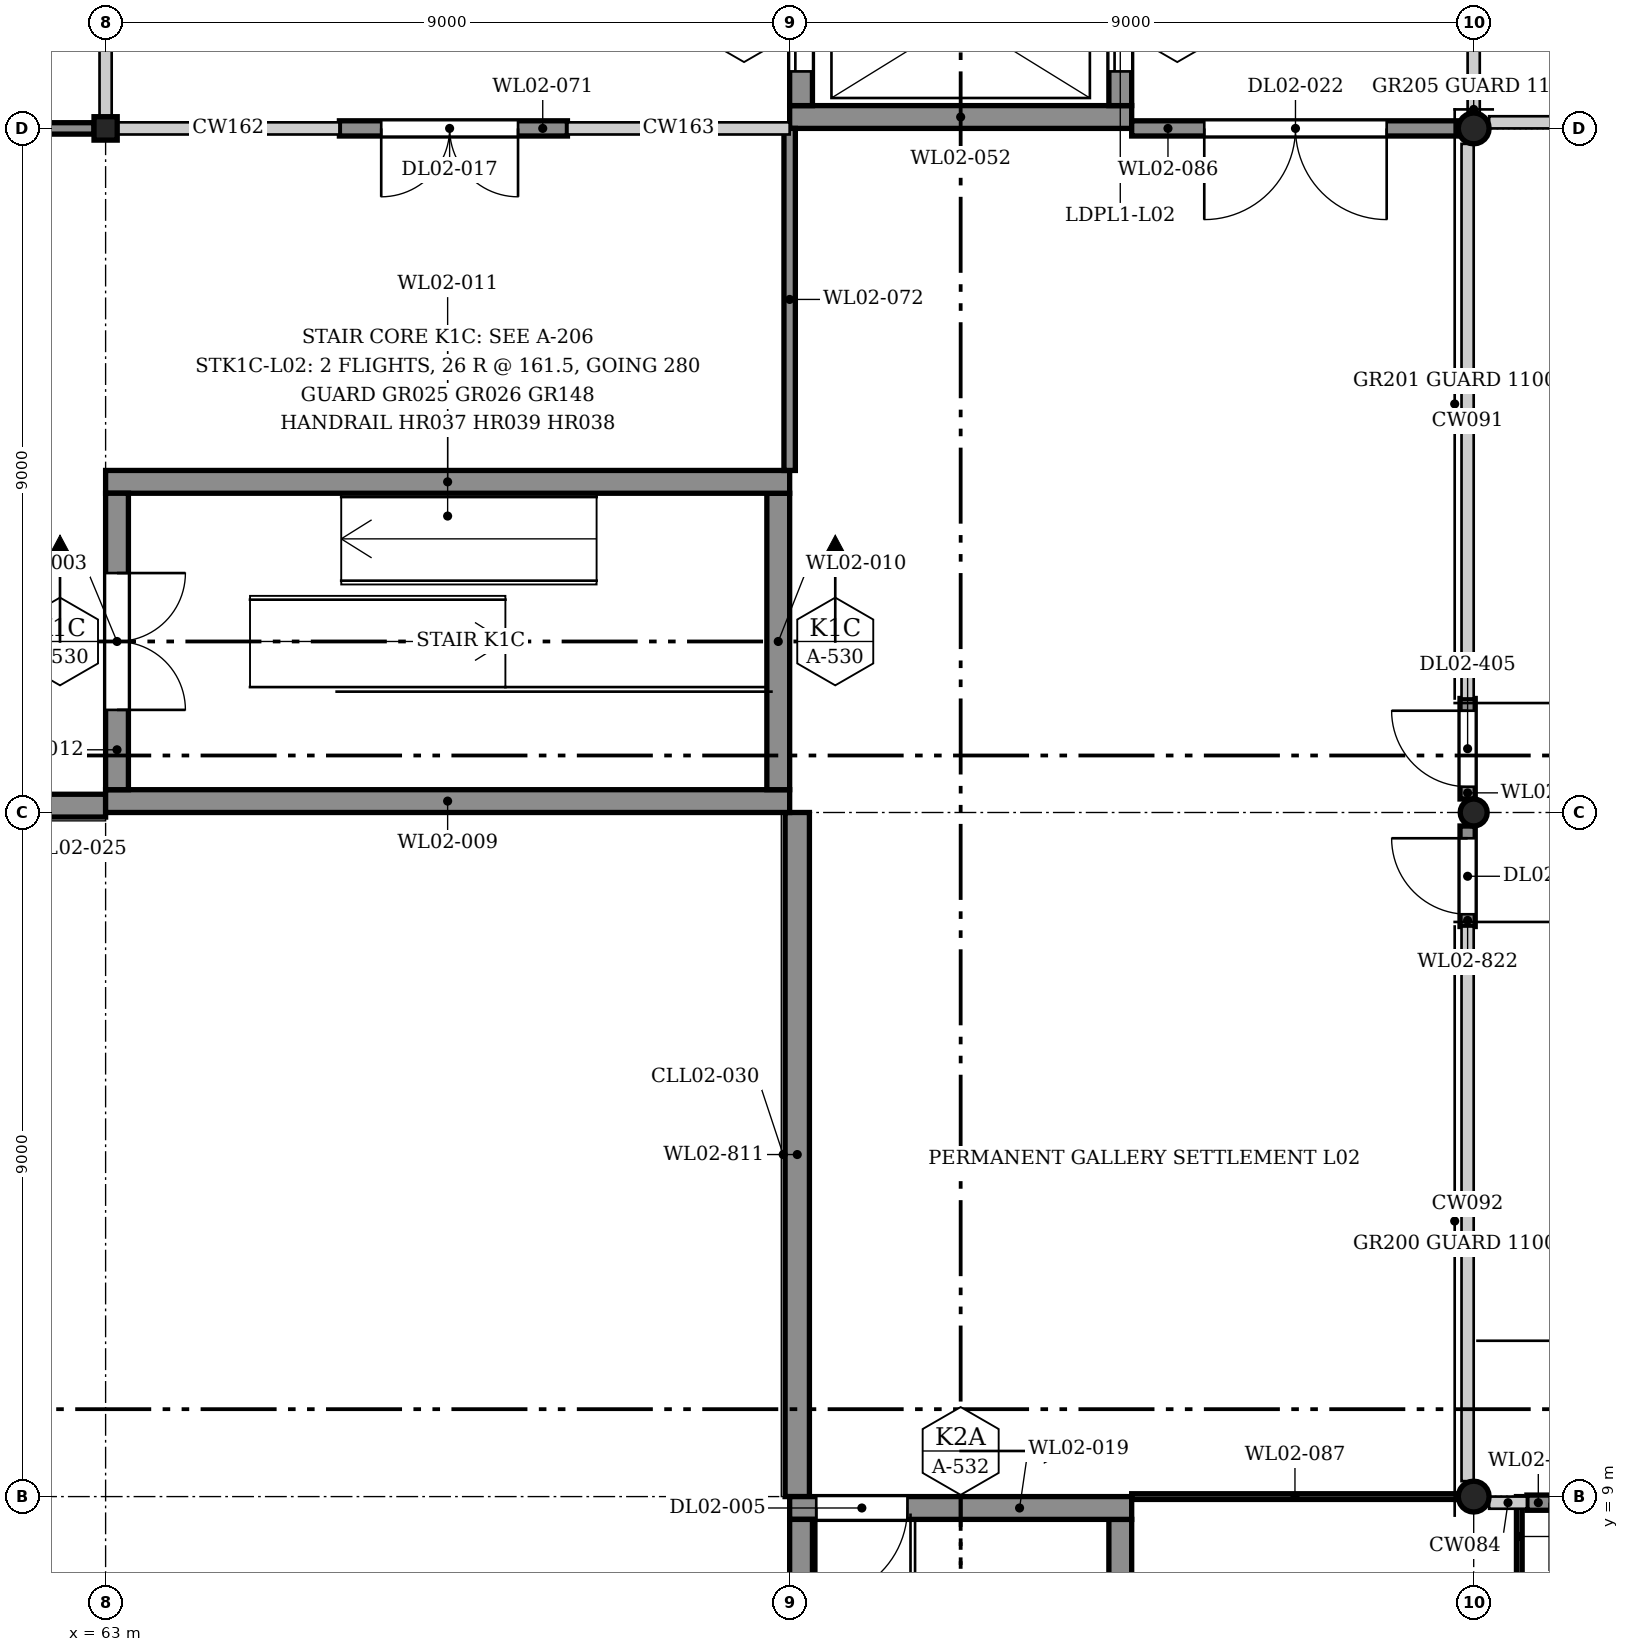
"""IFC4 building model, lengths in metres.
Left out: names, types, materials, properties, quantities, classifications, styles, units other than length and angle.
Written with IfcOpenShell. Run it as: python <this file> out.ifc"""

import sys

from ifc_helpers import new_model, si_unit, direction, frame, frame_2d, origin, origin_2d, place, context, subcontext, project, spatial, rectangle, hollow_circle, i_section, extrude, element, fill, save


model = new_model("IFC4")
c1 = context("Model", 3, precision=1e-05, world=origin(), true_north=direction((0.0, 1.0)))
c2 = subcontext(c1, "Body", "Model", "MODEL_VIEW")
j1 = project(units=[si_unit("LENGTHUNIT", "METRE"), si_unit("PLANEANGLEUNIT", "RADIAN")], contexts=[c1])
p1 = place(None, origin())
s1 = spatial("IfcSite", under=j1, at=p1, CompositionType="ELEMENT")
p2 = place(p1, origin())
s2 = spatial("IfcBuilding", under=s1, at=p2, CompositionType="ELEMENT")
p3 = place(p2, frame((0.0, 0.0, 9.2)))
s3 = spatial("IfcBuildingStorey", under=s2, at=p3, CompositionType="ELEMENT", Elevation=9.2)
p4 = place(p3, frame((81.0, 9.0, 0.0), z_axis=(0.0, 0.0, 1.0), x_axis=(1.0, 0.0, 0.0)))
e1 = element("IfcColumn", 1, at=p4, inside=s3, PredefinedType="COLUMN", context=c2, shape_type="SweptSolid", body=[
    extrude(hollow_circle(Radius=0.203, WallThickness=0.013, at=origin_2d()), origin(), (0.0, 0.0, 1.0), 4.2),
])
p5 = place(p3, frame((81.0, 18.0, 0.0), z_axis=(0.0, 0.0, 1.0), x_axis=(1.0, 0.0, 0.0)))
e2 = element("IfcColumn", 2, at=p5, inside=s3, PredefinedType="COLUMN", context=c2, shape_type="SweptSolid", body=[
    extrude(hollow_circle(Radius=0.178, WallThickness=0.013, at=origin_2d()), origin(), (0.0, 0.0, 1.0), 4.2),
])
p6 = place(p3, frame((63.0, 27.0, 0.0), z_axis=(0.0, 0.0, 1.0), x_axis=(1.0, 0.0, 0.0)))
e3 = element("IfcColumn", 3, at=p6, inside=s3, PredefinedType="COLUMN", context=c2, shape_type="SweptSolid", body=[
    extrude(i_section(OverallWidth=0.305, OverallDepth=0.308, WebThickness=0.01, FlangeThickness=0.015, FilletRadius=0.017, at=origin_2d()), origin(), (0.0, 0.0, 1.0), 4.2),
])
p7 = place(p3, frame((81.0, 27.0, 0.0), z_axis=(0.0, 0.0, 1.0), x_axis=(1.0, 0.0, 0.0)))
e4 = element("IfcColumn", 4, at=p7, inside=s3, PredefinedType="COLUMN", context=c2, shape_type="SweptSolid", body=[
    extrude(hollow_circle(Radius=0.203, WallThickness=0.013, at=origin_2d()), origin(), (0.0, 0.0, 1.0), 4.2),
])
p8 = place(p3, frame((54.25, 18.09, 0.0), z_axis=(0.0, 0.0, 1.0), x_axis=(1.0, 0.0, 0.0)))
e5 = element("IfcWall", 5, at=p8, inside=s3, PredefinedType="SOLIDWALL", context=c2, shape_type="SweptSolid", body=[
    extrude(rectangle(XDim=8.75, YDim=0.3, at=frame_2d((4.375, 0.0))), origin(), (0.0, 0.0, 1.0), 3.578),
])
p9 = place(p8, frame((1.4, 0.0, 0.9)))
e6 = element("IfcOpeningElement", 6, at=p9, cuts=e5, PredefinedType="OPENING", context=c2, shape_type="SweptSolid", body=[
    extrude(rectangle(XDim=1.2, YDim=2.3, at=frame_2d((0.6, 1.15))), frame((0.0, 0.16, 0.0), z_axis=(0.0, -1.0, 0.0), x_axis=(1.0, 0.0, 0.0)), (0.0, 0.0, 1.0), 0.32),
])
p10 = place(p8, frame((5.9, 0.0, 0.9)))
e7 = element("IfcOpeningElement", 7, at=p10, cuts=e5, PredefinedType="OPENING", context=c2, shape_type="SweptSolid", body=[
    extrude(rectangle(XDim=1.2, YDim=2.3, at=frame_2d((0.6, 1.15))), frame((0.0, 0.16, 0.0), z_axis=(0.0, -1.0, 0.0), x_axis=(1.0, 0.0, 0.0)), (0.0, 0.0, 1.0), 0.32),
])
p11 = place(p3, frame((72.1, 9.0, 0.0), z_axis=(0.0, 0.0, 1.0), x_axis=(0.0, 1.0, 0.0)))
e8 = element("IfcWall", 8, at=p11, inside=s3, PredefinedType="SOLIDWALL", context=c2, shape_type="SweptSolid", body=[
    extrude(rectangle(XDim=9.0, YDim=0.32, at=frame_2d((4.5, 0.0))), origin(), (0.0, 0.0, 1.0), 4.035),
])
p12 = place(p3, frame((81.7, 8.92, 0.0), z_axis=(0.0, 0.0, 1.0), x_axis=(1.0, 0.0, 0.0)))
e9 = element("IfcWall", 9, at=p12, inside=s3, PredefinedType="SOLIDWALL", context=c2, shape_type="SweptSolid", body=[
    extrude(rectangle(XDim=2.4, YDim=0.2, at=frame_2d((1.2, 0.0))), origin(), (0.0, 0.0, 1.0), 3.125),
])
p13 = place(p12, frame((0.3, 0.0, 0.0)))
e10 = element("IfcOpeningElement", 10, at=p13, cuts=e9, PredefinedType="OPENING", context=c2, shape_type="SweptSolid", body=[
    extrude(rectangle(XDim=1.8, YDim=2.4, at=frame_2d((0.9, 1.2))), frame((0.0, 0.11, 0.0), z_axis=(0.0, -1.0, 0.0), x_axis=(1.0, 0.0, 0.0)), (0.0, 0.0, 1.0), 0.22),
])
p14 = place(p3, frame((80.92, 18.178, 0.0), z_axis=(0.0, 0.0, 1.0), x_axis=(0.0, 1.0, 0.0)))
e11 = element("IfcWall", 11, at=p14, inside=s3, PredefinedType="SOLIDWALL", context=c2, shape_type="SweptSolid", body=[
    extrude(rectangle(XDim=1.322, YDim=0.2, at=frame_2d((0.661, 0.0))), origin(), (0.0, 0.0, 1.0), 3.428),
])
p15 = place(p14, frame((0.161, 0.0, 0.0)))
e12 = element("IfcOpeningElement", 12, at=p15, cuts=e11, PredefinedType="OPENING", context=c2, shape_type="SweptSolid", body=[
    extrude(rectangle(XDim=1.0, YDim=2.4, at=frame_2d((0.5, 1.2))), frame((0.0, 0.11, 0.0), z_axis=(0.0, -1.0, 0.0), x_axis=(1.0, 0.0, 0.0)), (0.0, 0.0, 1.0), 0.22),
])
p16 = place(p3, frame((80.92, 16.5, 0.0), z_axis=(0.0, 0.0, 1.0), x_axis=(0.0, 1.0, 0.0)))
e13 = element("IfcWall", 13, at=p16, inside=s3, PredefinedType="SOLIDWALL", context=c2, shape_type="SweptSolid", body=[
    extrude(rectangle(XDim=1.322, YDim=0.2, at=frame_2d((0.661, 0.0))), origin(), (0.0, 0.0, 1.0), 3.428),
])
p17 = place(p16, frame((0.161, 0.0, 0.0)))
e14 = element("IfcOpeningElement", 14, at=p17, cuts=e13, PredefinedType="OPENING", context=c2, shape_type="SweptSolid", body=[
    extrude(rectangle(XDim=1.0, YDim=2.4, at=frame_2d((0.5, 1.2))), frame((0.0, 0.11, 0.0), z_axis=(0.0, -1.0, 0.0), x_axis=(1.0, 0.0, 0.0)), (0.0, 0.0, 1.0), 0.22),
])
p18 = place(p3, frame((63.0, 18.15, 0.0), z_axis=(0.0, 0.0, 1.0), x_axis=(1.0, 0.0, 0.0)))
e15 = element("IfcWall", 15, at=p18, inside=s3, PredefinedType="SOLIDWALL", context=c2, shape_type="SweptSolid", body=[
    extrude(rectangle(XDim=9.0, YDim=0.3, at=frame_2d((4.5, 0.0))), origin(), (0.0, 0.0, 1.0), 4.2),
])
p19 = place(p3, frame((71.85, 18.3, 0.0), z_axis=(0.0, 0.0, 1.0), x_axis=(0.0, 1.0, 0.0)))
e16 = element("IfcWall", 16, at=p19, inside=s3, PredefinedType="SOLIDWALL", context=c2, shape_type="SweptSolid", body=[
    extrude(rectangle(XDim=3.9, YDim=0.3, at=frame_2d((1.95, 0.0))), origin(), (0.0, 0.0, 1.0), 4.2),
])
p20 = place(p3, frame((63.0, 22.35, 0.0), z_axis=(0.0, 0.0, 1.0), x_axis=(1.0, 0.0, 0.0)))
e17 = element("IfcWall", 17, at=p20, inside=s3, PredefinedType="SOLIDWALL", context=c2, shape_type="SweptSolid", body=[
    extrude(rectangle(XDim=9.0, YDim=0.3, at=frame_2d((4.5, 0.0))), origin(), (0.0, 0.0, 1.0), 4.2),
])
p21 = place(p3, frame((63.15, 18.3, 0.0), z_axis=(0.0, 0.0, 1.0), x_axis=(0.0, 1.0, 0.0)))
e18 = element("IfcWall", 18, at=p21, inside=s3, PredefinedType="SOLIDWALL", context=c2, shape_type="SweptSolid", body=[
    extrude(rectangle(XDim=3.9, YDim=0.3, at=frame_2d((1.95, 0.0))), origin(), (0.0, 0.0, 1.0), 4.2),
])
p22 = place(p21, frame((1.05, 0.0, 0.0)))
e19 = element("IfcOpeningElement", 19, at=p22, cuts=e18, PredefinedType="OPENING", context=c2, shape_type="SweptSolid", body=[
    extrude(rectangle(XDim=1.8, YDim=2.1, at=frame_2d((0.9, 1.05))), frame((0.0, 0.16, 0.0), z_axis=(0.0, -1.0, 0.0), x_axis=(1.0, 0.0, 0.0)), (0.0, 0.0, 1.0), 0.32),
])
p23 = place(p3, frame((76.35, 0.3, 0.0), z_axis=(0.0, 0.0, 1.0), x_axis=(0.0, 1.0, 0.0)))
e20 = element("IfcWall", 20, at=p23, inside=s3, PredefinedType="SOLIDWALL", context=c2, shape_type="SweptSolid", body=[
    extrude(rectangle(XDim=8.4, YDim=0.3, at=frame_2d((4.2, 0.0))), origin(), (0.0, 0.0, 1.0), 4.2),
])
p24 = place(p3, frame((72.0, 8.85, 0.0), z_axis=(0.0, 0.0, 1.0), x_axis=(1.0, 0.0, 0.0)))
e21 = element("IfcWall", 21, at=p24, inside=s3, PredefinedType="SOLIDWALL", context=c2, shape_type="SweptSolid", body=[
    extrude(rectangle(XDim=4.5, YDim=0.3, at=frame_2d((2.25, 0.0))), origin(), (0.0, 0.0, 1.0), 4.2),
])
p25 = place(p24, frame((0.35, 0.0, 0.0)))
e22 = element("IfcOpeningElement", 22, at=p25, cuts=e21, PredefinedType="OPENING", context=c2, shape_type="SweptSolid", body=[
    extrude(rectangle(XDim=1.2, YDim=2.1, at=frame_2d((0.6, 1.05))), frame((0.0, 0.16, 0.0), z_axis=(0.0, -1.0, 0.0), x_axis=(1.0, 0.0, 0.0)), (0.0, 0.0, 1.0), 0.32),
])
p26 = place(p3, frame((72.15, 0.3, 0.0), z_axis=(0.0, 0.0, 1.0), x_axis=(0.0, 1.0, 0.0)))
e23 = element("IfcWall", 23, at=p26, inside=s3, PredefinedType="SOLIDWALL", context=c2, shape_type="SweptSolid", body=[
    extrude(rectangle(XDim=8.4, YDim=0.3, at=frame_2d((4.2, 0.0))), origin(), (0.0, 0.0, 1.0), 4.2),
])
p27 = place(p3, frame((72.0, 27.15, 0.0), z_axis=(0.0, 0.0, 1.0), x_axis=(1.0, 0.0, 0.0)))
e24 = element("IfcWall", 24, at=p27, inside=s3, PredefinedType="SOLIDWALL", context=c2, shape_type="SweptSolid", body=[
    extrude(rectangle(XDim=4.5, YDim=0.3, at=frame_2d((2.25, 0.0))), origin(), (0.0, 0.0, 1.0), 4.2),
])
p28 = place(p3, frame((76.35, 27.3, 0.0), z_axis=(0.0, 0.0, 1.0), x_axis=(0.0, 1.0, 0.0)))
e25 = element("IfcWall", 25, at=p28, inside=s3, PredefinedType="SOLIDWALL", context=c2, shape_type="SweptSolid", body=[
    extrude(rectangle(XDim=8.4, YDim=0.3, at=frame_2d((4.2, 0.0))), origin(), (0.0, 0.0, 1.0), 4.2),
])
p29 = place(p28, frame((0.45, 0.0, 0.0)))
e26 = element("IfcOpeningElement", 26, at=p29, cuts=e25, PredefinedType="OPENING", context=c2, shape_type="SweptSolid", body=[
    extrude(rectangle(XDim=1.4, YDim=2.1, at=frame_2d((0.7, 1.05))), frame((0.0, 0.16, 0.0), z_axis=(0.0, -1.0, 0.0), x_axis=(1.0, 0.0, 0.0)), (0.0, 0.0, 1.0), 0.32),
])
p30 = place(p28, frame((4.925, 0.0, 0.0)))
e27 = element("IfcOpeningElement", 27, at=p30, cuts=e25, PredefinedType="OPENING", context=c2, shape_type="SweptSolid", body=[
    extrude(rectangle(XDim=1.0, YDim=2.1, at=frame_2d((0.5, 1.05))), frame((0.0, 0.16, 0.0), z_axis=(0.0, -1.0, 0.0), x_axis=(1.0, 0.0, 0.0)), (0.0, 0.0, 1.0), 0.32),
])
p31 = place(p3, frame((72.15, 27.3, 0.0), z_axis=(0.0, 0.0, 1.0), x_axis=(0.0, 1.0, 0.0)))
e28 = element("IfcWall", 28, at=p31, inside=s3, PredefinedType="SOLIDWALL", context=c2, shape_type="SweptSolid", body=[
    extrude(rectangle(XDim=8.4, YDim=0.3, at=frame_2d((4.2, 0.0))), origin(), (0.0, 0.0, 1.0), 4.2),
])
p32 = place(p31, frame((0.45, 0.0, 0.0)))
e29 = element("IfcOpeningElement", 29, at=p32, cuts=e28, PredefinedType="OPENING", context=c2, shape_type="SweptSolid", body=[
    extrude(rectangle(XDim=1.4, YDim=2.1, at=frame_2d((0.7, 1.05))), frame((0.0, 0.16, 0.0), z_axis=(0.0, -1.0, 0.0), x_axis=(1.0, 0.0, 0.0)), (0.0, 0.0, 1.0), 0.32),
])
p33 = place(p3, frame((54.25, 27.0, 0.0), z_axis=(0.0, 0.0, 1.0), x_axis=(1.0, 0.0, 0.0)))
e30 = element("IfcWall", 30, at=p33, inside=s3, PredefinedType="PARTITIONING", context=c2, shape_type="SweptSolid", body=[
    extrude(rectangle(XDim=8.597, YDim=0.15, at=frame_2d((4.299, 0.0))), origin(), (0.0, 0.0, 1.0), 3.502),
])
p34 = place(p3, frame((66.076, 27.0, 0.0), z_axis=(0.0, 0.0, 1.0), x_axis=(1.0, 0.0, 0.0)))
e31 = element("IfcWall", 31, at=p34, inside=s3, PredefinedType="PARTITIONING", context=c2, shape_type="SweptSolid", body=[
    extrude(rectangle(XDim=3.0, YDim=0.2, at=frame_2d((1.5, 0.0))), origin(), (0.0, 0.0, 1.0), 3.502),
])
p35 = place(p34, frame((0.55, 0.0, 0.0)))
e32 = element("IfcOpeningElement", 32, at=p35, cuts=e31, PredefinedType="OPENING", context=c2, shape_type="SweptSolid", body=[
    extrude(rectangle(XDim=1.8, YDim=2.1, at=frame_2d((0.9, 1.05))), frame((0.0, 0.11, 0.0), z_axis=(0.0, -1.0, 0.0), x_axis=(1.0, 0.0, 0.0)), (0.0, 0.0, 1.0), 0.22),
])
p36 = place(p3, frame((72.0, 22.5, 0.0), z_axis=(0.0, 0.0, 1.0), x_axis=(0.0, 1.0, 0.0)))
e33 = element("IfcWall", 33, at=p36, inside=s3, PredefinedType="PARTITIONING", context=c2, shape_type="SweptSolid", body=[
    extrude(rectangle(XDim=4.5, YDim=0.15, at=frame_2d((2.25, 0.0))), origin(), (0.0, 0.0, 1.0), 3.502),
])
p37 = place(p3, frame((76.5, 27.0, 0.0), z_axis=(0.0, 0.0, 1.0), x_axis=(1.0, 0.0, 0.0)))
e34 = element("IfcWall", 34, at=p37, inside=s3, PredefinedType="PARTITIONING", context=c2, shape_type="SweptSolid", body=[
    extrude(rectangle(XDim=4.297, YDim=0.2, at=frame_2d((2.148, 0.0))), origin(), (0.0, 0.0, 1.0), 3.502),
])
p38 = place(p37, frame((0.955, 0.0, 0.0)))
e35 = element("IfcOpeningElement", 35, at=p38, cuts=e34, PredefinedType="OPENING", context=c2, shape_type="SweptSolid", body=[
    extrude(rectangle(XDim=2.4, YDim=2.4, at=frame_2d((1.2, 1.2))), frame((0.0, 0.11, 0.0), z_axis=(0.0, -1.0, 0.0), x_axis=(1.0, 0.0, 0.0)), (0.0, 0.0, 1.0), 0.22),
])
p39 = place(p3, frame((76.5, 9.0, 0.0), z_axis=(0.0, 0.0, 1.0), x_axis=(1.0, 0.0, 0.0)))
e36 = element("IfcWall", 36, at=p39, inside=s3, PredefinedType="PARTITIONING", context=c2, shape_type="SweptSolid", body=[
    extrude(rectangle(XDim=4.297, YDim=0.075, at=frame_2d((2.148, 0.0))), origin(), (0.0, 0.0, 1.0), 3.502),
])
p40 = place(p3, frame((81.6, 6.0, 0.0), z_axis=(0.0, 0.0, 1.0), x_axis=(0.0, 1.0, 0.0)))
e37 = element("IfcWall", 37, at=p40, inside=s3, PredefinedType="PARTITIONING", context=c2, shape_type="SweptSolid", body=[
    extrude(rectangle(XDim=3.0, YDim=0.075, at=frame_2d((1.5, 0.0))), origin(), (0.0, 0.0, 1.0), 3.428),
])
p41 = place(p40, frame((0.95, 0.0, 0.0)))
e38 = element("IfcOpeningElement", 38, at=p41, cuts=e37, PredefinedType="OPENING", context=c2, shape_type="SweptSolid", body=[
    extrude(rectangle(XDim=1.0, YDim=2.1, at=frame_2d((0.5, 1.05))), frame((0.0, 0.047, 0.0), z_axis=(0.0, -1.0, 0.0), x_axis=(1.0, 0.0, 0.0)), (0.0, 0.0, 1.0), 0.095),
])
p42 = place(p15, origin())
e39 = element("IfcDoor", 39, at=p42, inside=s3, OperationType="SINGLE_SWING_LEFT", PredefinedType="DOOR", context=c2, shape_type="SweptSolid", body=[
    extrude(rectangle(XDim=1.0, YDim=2.4, at=frame_2d((0.5, 1.2))), frame((0.0, 0.025, 0.0), z_axis=(0.0, -1.0, 0.0), x_axis=(1.0, 0.0, 0.0)), (0.0, 0.0, 1.0), 0.05),
])
fill(e12, e39)
p43 = place(p17, origin())
e40 = element("IfcDoor", 40, at=p43, inside=s3, OperationType="SINGLE_SWING_LEFT", PredefinedType="DOOR", context=c2, shape_type="SweptSolid", body=[
    extrude(rectangle(XDim=1.0, YDim=2.4, at=frame_2d((0.5, 1.2))), frame((0.0, 0.025, 0.0), z_axis=(0.0, -1.0, 0.0), x_axis=(1.0, 0.0, 0.0)), (0.0, 0.0, 1.0), 0.05),
])
fill(e14, e40)
p44 = place(p22, frame((1.8, 0.0, 0.0), z_axis=(0.0, 0.0, 1.0), x_axis=(-1.0, 0.0, 0.0)))
e41 = element("IfcDoor", 41, at=p44, inside=s3, OperationType="DOUBLE_DOOR_SINGLE_SWING", PredefinedType="DOOR", context=c2, shape_type="SweptSolid", body=[
    extrude(rectangle(XDim=1.8, YDim=2.1, at=frame_2d((0.9, 1.05))), frame((0.0, 0.025, 0.0), z_axis=(0.0, -1.0, 0.0), x_axis=(1.0, 0.0, 0.0)), (0.0, 0.0, 1.0), 0.05),
])
fill(e19, e41)
p45 = place(p25, frame((1.2, 0.0, 0.0), z_axis=(0.0, 0.0, 1.0), x_axis=(-1.0, 0.0, 0.0)))
e42 = element("IfcDoor", 42, at=p45, inside=s3, OperationType="SINGLE_SWING_LEFT", PredefinedType="DOOR", context=c2, shape_type="SweptSolid", body=[
    extrude(rectangle(XDim=1.2, YDim=2.1, at=frame_2d((0.6, 1.05))), frame((0.0, 0.025, 0.0), z_axis=(0.0, -1.0, 0.0), x_axis=(1.0, 0.0, 0.0)), (0.0, 0.0, 1.0), 0.05),
])
fill(e22, e42)
p46 = place(p29, origin())
e43 = element("IfcDoor", 43, at=p46, inside=s3, OperationType="SLIDING_TO_LEFT", PredefinedType="DOOR", context=c2, shape_type="SweptSolid", body=[
    extrude(rectangle(XDim=1.4, YDim=2.1, at=frame_2d((0.7, 1.05))), frame((0.0, 0.025, 0.0), z_axis=(0.0, -1.0, 0.0), x_axis=(1.0, 0.0, 0.0)), (0.0, 0.0, 1.0), 0.05),
])
fill(e26, e43)
p47 = place(p32, origin())
e44 = element("IfcDoor", 44, at=p47, inside=s3, OperationType="SLIDING_TO_RIGHT", PredefinedType="DOOR", context=c2, shape_type="SweptSolid", body=[
    extrude(rectangle(XDim=1.4, YDim=2.1, at=frame_2d((0.7, 1.05))), frame((0.0, 0.025, 0.0), z_axis=(0.0, -1.0, 0.0), x_axis=(1.0, 0.0, 0.0)), (0.0, 0.0, 1.0), 0.05),
])
fill(e29, e44)
p48 = place(p35, frame((1.8, 0.0, 0.0), z_axis=(0.0, 0.0, 1.0), x_axis=(-1.0, 0.0, 0.0)))
e45 = element("IfcDoor", 45, at=p48, inside=s3, OperationType="DOUBLE_DOOR_SINGLE_SWING", PredefinedType="DOOR", context=c2, shape_type="SweptSolid", body=[
    extrude(rectangle(XDim=1.8, YDim=2.1, at=frame_2d((0.9, 1.05))), frame((0.0, 0.025, 0.0), z_axis=(0.0, -1.0, 0.0), x_axis=(1.0, 0.0, 0.0)), (0.0, 0.0, 1.0), 0.05),
])
fill(e32, e45)
p49 = place(p38, frame((2.4, 0.0, 0.0), z_axis=(0.0, 0.0, 1.0), x_axis=(-1.0, 0.0, 0.0)))
e46 = element("IfcDoor", 46, at=p49, inside=s3, OperationType="DOUBLE_DOOR_SINGLE_SWING", PredefinedType="DOOR", context=c2, shape_type="SweptSolid", body=[
    extrude(rectangle(XDim=2.4, YDim=2.4, at=frame_2d((1.2, 1.2))), frame((0.0, 0.025, 0.0), z_axis=(0.0, -1.0, 0.0), x_axis=(1.0, 0.0, 0.0)), (0.0, 0.0, 1.0), 0.05),
])
fill(e35, e46)
save(model, sys.argv[1])
